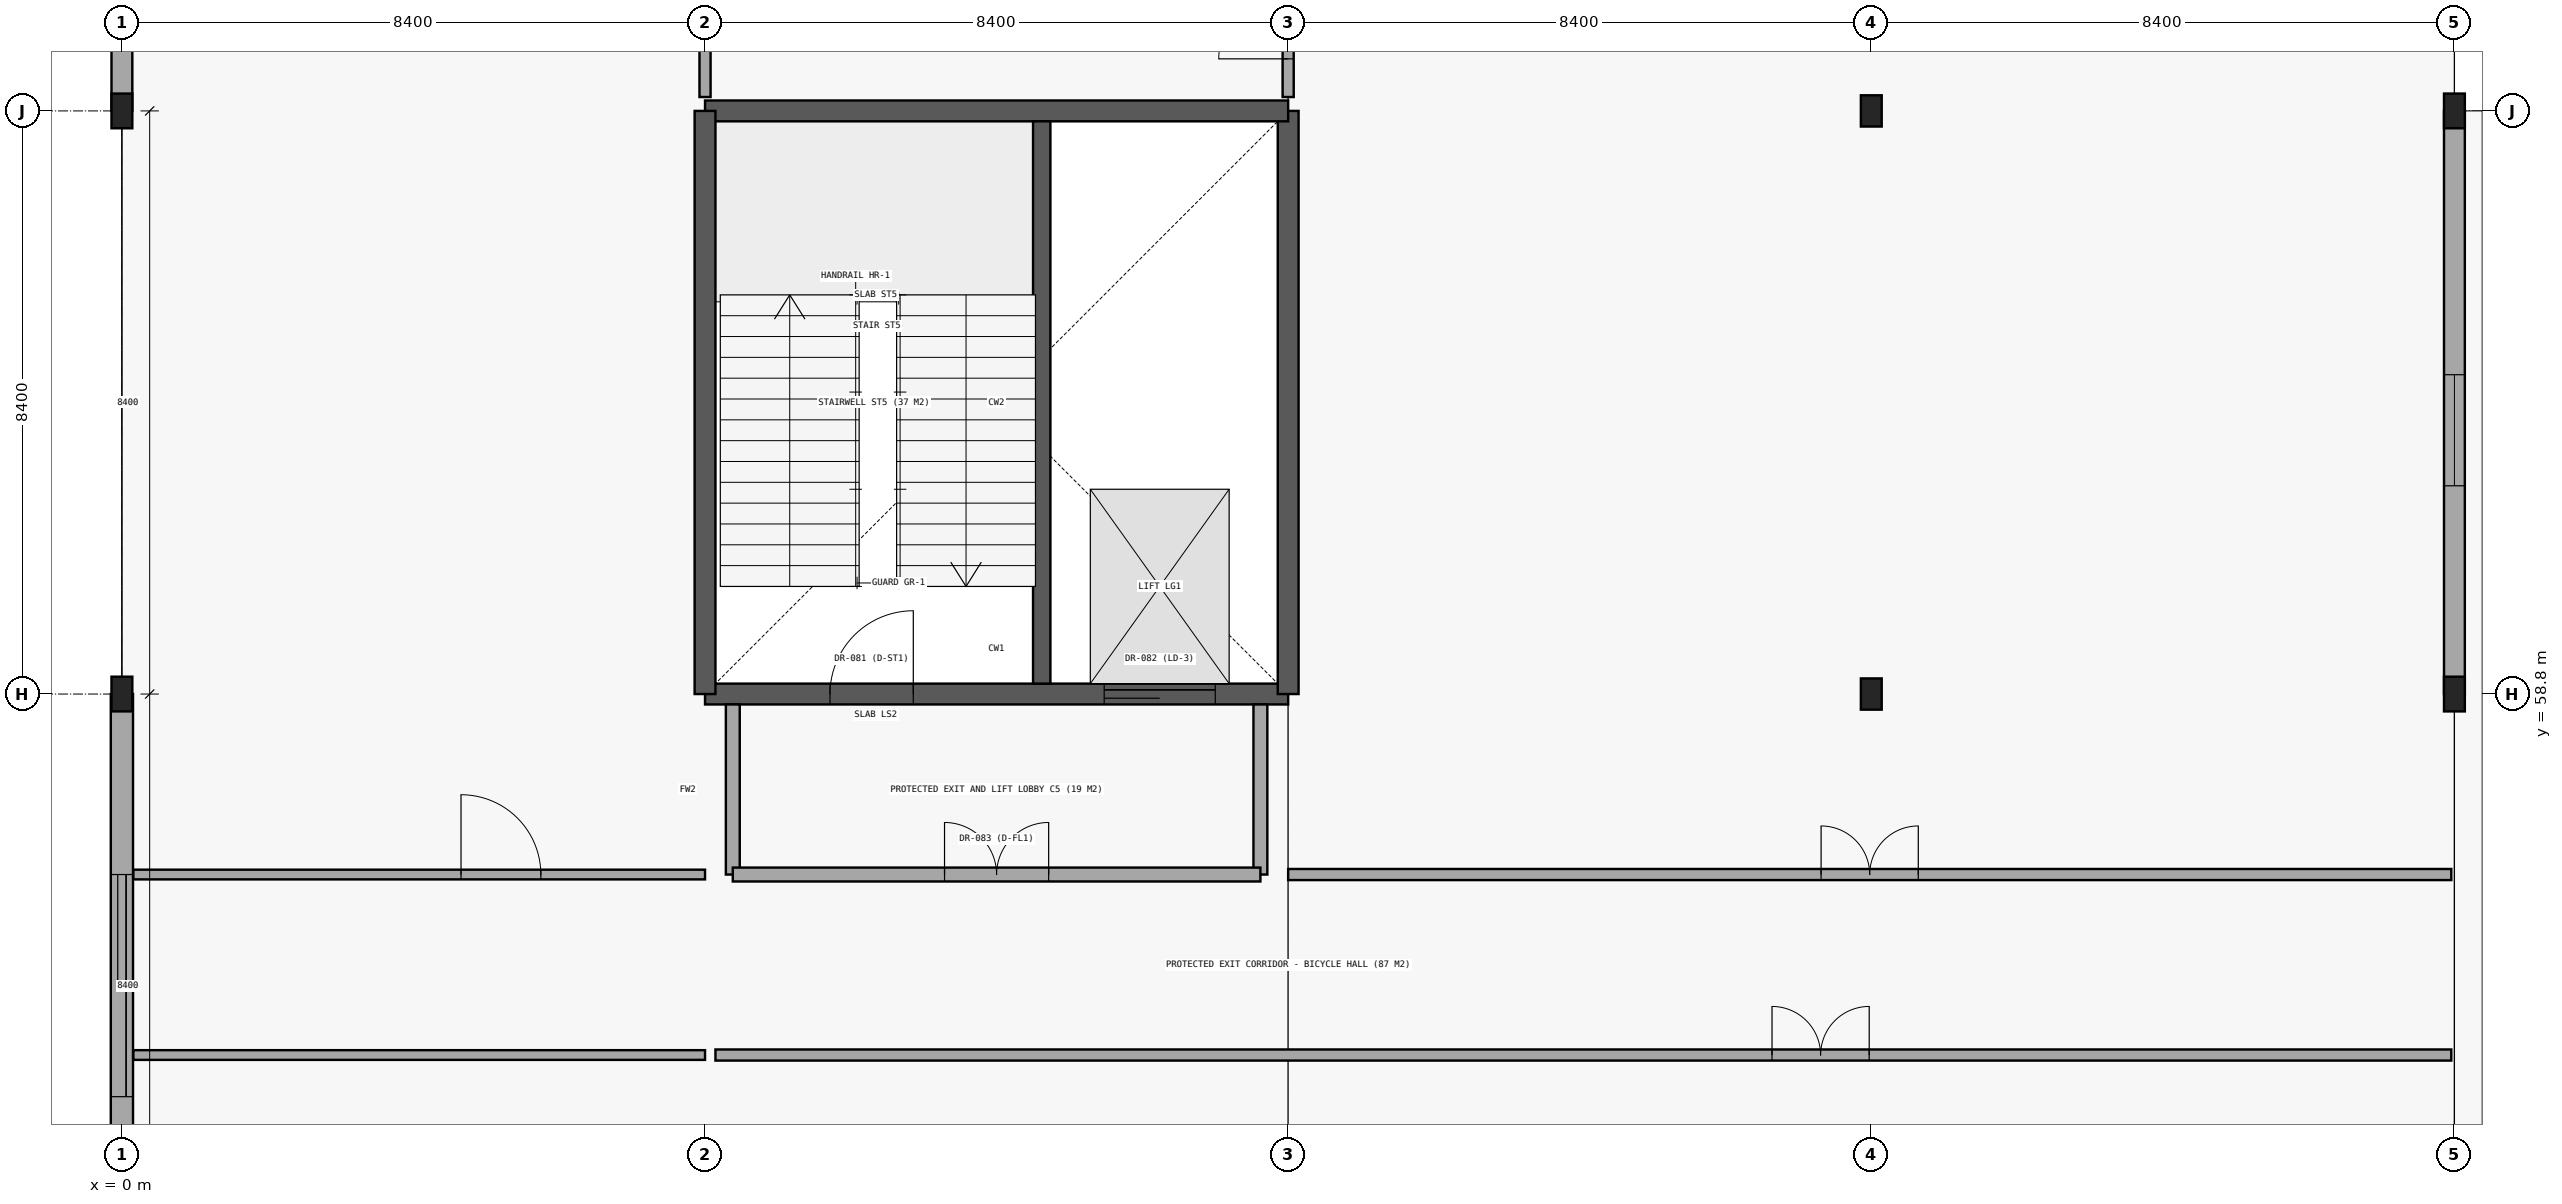
"""IFC4 building model, lengths in metres.
Left out: names, types, materials, properties, quantities, classifications, styles, units other than length and angle.
Written with IfcOpenShell. Run it as: python <this file> out.ifc"""

import sys

from ifc_helpers import new_model, si_unit, direction, frame, frame_2d, origin, origin_2d, place, context, subcontext, project, spatial, rectangle, i_section, extrude, element, fill, save


model = new_model("IFC4")
c1 = context("Model", 3, precision=1e-05, world=origin(), true_north=direction((0.0, 1.0)))
c2 = subcontext(c1, "Body", "Model", "MODEL_VIEW")
j1 = project(units=[si_unit("LENGTHUNIT", "METRE"), si_unit("PLANEANGLEUNIT", "RADIAN")], contexts=[c1])
p1 = place(None, origin())
s1 = spatial("IfcSite", under=j1, at=p1, CompositionType="ELEMENT")
p2 = place(p1, origin())
s2 = spatial("IfcBuilding", under=s1, at=p2, CompositionType="ELEMENT")
p3 = place(p2, origin())
s3 = spatial("IfcBuildingStorey", under=s2, at=p3, CompositionType="ELEMENT", Elevation=0.0)
p4 = place(p3, frame((8.4, 58.8, 0.0), z_axis=(0.0, 0.0, 1.0), x_axis=(1.0, 0.0, 0.0)))
e1 = element("IfcWall", 1, at=p4, inside=s3, PredefinedType="SHEAR", context=c2, shape_type="SweptSolid", body=[
    extrude(rectangle(XDim=8.4, YDim=0.3, at=frame_2d((4.2, 0.0))), origin(), (0.0, 0.0, 1.0), 4.8),
])
p5 = place(p4, frame((1.8, 0.0, 0.0)))
e2 = element("IfcOpeningElement", 2, at=p5, cuts=e1, PredefinedType="OPENING", context=c2, shape_type="SweptSolid", body=[
    extrude(rectangle(XDim=1.2, YDim=2.2, at=frame_2d((0.6, 1.1))), frame((0.0, 0.16, 0.0), z_axis=(0.0, -1.0, 0.0), x_axis=(1.0, 0.0, 0.0)), (0.0, 0.0, 1.0), 0.32),
])
p6 = place(p4, frame((5.75, 0.0, 0.0)))
e3 = element("IfcOpeningElement", 3, at=p6, cuts=e1, PredefinedType="OPENING", context=c2, shape_type="SweptSolid", body=[
    extrude(rectangle(XDim=1.6, YDim=2.4, at=frame_2d((0.8, 1.2))), frame((0.0, 0.16, 0.0), z_axis=(0.0, -1.0, 0.0), x_axis=(1.0, 0.0, 0.0)), (0.0, 0.0, 1.0), 0.32),
])
p7 = place(p3, frame((16.8, 58.8, 0.0), z_axis=(0.0, 0.0, 1.0), x_axis=(0.0, 1.0, 0.0)))
e4 = element("IfcWall", 4, at=p7, inside=s3, PredefinedType="SHEAR", context=c2, shape_type="SweptSolid", body=[
    extrude(rectangle(XDim=8.4, YDim=0.3, at=frame_2d((4.2, 0.0))), origin(), (0.0, 0.0, 1.0), 4.8),
])
p8 = place(p3, frame((16.8, 67.2, 0.0), z_axis=(0.0, 0.0, 1.0), x_axis=(-1.0, 0.0, 0.0)))
e5 = element("IfcWall", 5, at=p8, inside=s3, PredefinedType="SHEAR", context=c2, shape_type="SweptSolid", body=[
    extrude(rectangle(XDim=8.4, YDim=0.3, at=frame_2d((4.2, 0.0))), origin(), (0.0, 0.0, 1.0), 4.8),
])
p9 = place(p3, frame((8.4, 67.2, 0.0), z_axis=(0.0, 0.0, 1.0), x_axis=(0.0, -1.0, 0.0)))
e6 = element("IfcWall", 6, at=p9, inside=s3, PredefinedType="SHEAR", context=c2, shape_type="SweptSolid", body=[
    extrude(rectangle(XDim=8.4, YDim=0.3, at=frame_2d((4.2, 0.0))), origin(), (0.0, 0.0, 1.0), 4.8),
])
p10 = place(p3, frame((13.25, 58.95, 0.0), z_axis=(0.0, 0.0, 1.0), x_axis=(0.0, 1.0, 0.0)))
e7 = element("IfcWall", 7, at=p10, inside=s3, PredefinedType="SHEAR", context=c2, shape_type="SweptSolid", body=[
    extrude(rectangle(XDim=8.1, YDim=0.25, at=frame_2d((4.05, 0.0))), origin(), (0.0, 0.0, 1.0), 4.8),
])
for number, where, z_axis, x_axis in (
    (8, (0.0, 58.8, 0.0), (0.0, 0.0, 1.0), (1.0, 0.0, 0.0)),
    (9, (0.0, 67.2, 0.0), (0.0, 0.0, 1.0), (1.0, 0.0, 0.0)),
):
    element("IfcColumn", number, at=place(p3, frame(where, z_axis=z_axis, x_axis=x_axis)), inside=s3, PredefinedType="COLUMN", context=c2, shape_type="SweptSolid", body=[
        extrude(i_section(OverallWidth=0.3, OverallDepth=0.5, WebThickness=0.014, FlangeThickness=0.028, FilletRadius=0.027, at=origin_2d()), origin(), (0.0, 0.0, 1.0), 4.8),
    ])
for number, where, z_axis, x_axis in (
    (10, (25.2, 58.8, 0.0), (0.0, 0.0, 1.0), (1.0, 0.0, 0.0)),
    (11, (25.2, 67.2, 0.0), (0.0, 0.0, 1.0), (1.0, 0.0, 0.0)),
):
    element("IfcColumn", number, at=place(p3, frame(where, z_axis=z_axis, x_axis=x_axis)), inside=s3, PredefinedType="COLUMN", context=c2, shape_type="SweptSolid", body=[
        extrude(i_section(OverallWidth=0.3, OverallDepth=0.45, WebThickness=0.014, FlangeThickness=0.026, FilletRadius=0.027, at=origin_2d()), origin(), (0.0, 0.0, 1.0), 4.8),
    ])
for number, where, z_axis, x_axis in (
    (12, (33.6, 58.8, 0.0), (0.0, 0.0, 1.0), (1.0, 0.0, 0.0)),
    (13, (33.6, 67.2, 0.0), (0.0, 0.0, 1.0), (1.0, 0.0, 0.0)),
):
    element("IfcColumn", number, at=place(p3, frame(where, z_axis=z_axis, x_axis=x_axis)), inside=s3, PredefinedType="COLUMN", context=c2, shape_type="SweptSolid", body=[
        extrude(i_section(OverallWidth=0.3, OverallDepth=0.5, WebThickness=0.014, FlangeThickness=0.028, FilletRadius=0.027, at=origin_2d()), origin(), (0.0, 0.0, 1.0), 4.8),
    ])
p11 = place(p3, frame((0.0, 58.8, 0.0), z_axis=(0.0, 0.0, 1.0), x_axis=(0.0, -1.0, 0.0)))
e14 = element("IfcWall", 14, at=p11, inside=s3, PredefinedType="STANDARD", context=c2, shape_type="SweptSolid", body=[
    extrude(rectangle(XDim=8.4, YDim=0.32, at=frame_2d((4.2, 0.0))), origin(), (0.0, 0.0, 1.0), 4.22),
])
p12 = place(p11, frame((2.6, 0.0, 0.0)))
e15 = element("IfcOpeningElement", 15, at=p12, cuts=e14, PredefinedType="OPENING", context=c2, shape_type="SweptSolid", body=[
    extrude(rectangle(XDim=3.2, YDim=2.9, at=frame_2d((1.6, 1.45))), frame((0.0, 0.17, 0.0), z_axis=(0.0, -1.0, 0.0), x_axis=(1.0, 0.0, 0.0)), (0.0, 0.0, 1.0), 0.34),
])
p13 = place(p3, frame((0.0, 75.6, 0.0), z_axis=(0.0, 0.0, 1.0), x_axis=(0.0, -1.0, 0.0)))
e16 = element("IfcWall", 16, at=p13, inside=s3, PredefinedType="STANDARD", context=c2, shape_type="SweptSolid", body=[
    extrude(rectangle(XDim=8.4, YDim=0.3, at=frame_2d((4.2, 0.0))), origin(), (0.0, 0.0, 1.0), 4.22),
])
p14 = place(p3, frame((33.6, 58.8, 0.0), z_axis=(0.0, 0.0, 1.0), x_axis=(0.0, 1.0, 0.0)))
e17 = element("IfcWall", 17, at=p14, inside=s3, PredefinedType="STANDARD", context=c2, shape_type="SweptSolid", body=[
    extrude(rectangle(XDim=8.4, YDim=0.3, at=frame_2d((4.2, 0.0))), origin(), (0.0, 0.0, 1.0), 4.22),
])
p15 = place(p14, frame((3.0, 0.0, 2.1)))
e18 = element("IfcOpeningElement", 18, at=p15, cuts=e17, PredefinedType="OPENING", context=c2, shape_type="SweptSolid", body=[
    extrude(rectangle(XDim=1.6, YDim=1.0, at=frame_2d((0.8, 0.5))), frame((0.0, 0.16, 0.0), z_axis=(0.0, -1.0, 0.0), x_axis=(1.0, 0.0, 0.0)), (0.0, 0.0, 1.0), 0.32),
])
p16 = place(p3, frame((8.8, 56.2, 0.0), z_axis=(0.0, 0.0, 1.0), x_axis=(0.0, 1.0, 0.0)))
e19 = element("IfcWall", 19, at=p16, inside=s3, PredefinedType="PARTITIONING", context=c2, shape_type="SweptSolid", body=[
    extrude(rectangle(XDim=2.45, YDim=0.2, at=frame_2d((1.225, 0.0))), origin(), (0.0, 0.0, 1.0), 4.12),
])
p17 = place(p3, frame((16.4, 56.2, 0.0), z_axis=(0.0, 0.0, 1.0), x_axis=(0.0, 1.0, 0.0)))
e20 = element("IfcWall", 20, at=p17, inside=s3, PredefinedType="PARTITIONING", context=c2, shape_type="SweptSolid", body=[
    extrude(rectangle(XDim=2.45, YDim=0.2, at=frame_2d((1.225, 0.0))), origin(), (0.0, 0.0, 1.0), 4.1),
])
p18 = place(p3, frame((8.8, 56.2, 0.0), z_axis=(0.0, 0.0, 1.0), x_axis=(1.0, 0.0, 0.0)))
e21 = element("IfcWall", 21, at=p18, inside=s3, PredefinedType="PARTITIONING", context=c2, shape_type="SweptSolid", body=[
    extrude(rectangle(XDim=7.6, YDim=0.2, at=frame_2d((3.8, 0.0))), origin(), (0.0, 0.0, 1.0), 4.12),
])
p19 = place(p18, frame((3.05, 0.0, 0.0)))
e22 = element("IfcOpeningElement", 22, at=p19, cuts=e21, PredefinedType="OPENING", context=c2, shape_type="SweptSolid", body=[
    extrude(rectangle(XDim=1.5, YDim=2.2, at=frame_2d((0.75, 1.1))), frame((0.0, 0.11, 0.0), z_axis=(0.0, -1.0, 0.0), x_axis=(1.0, 0.0, 0.0)), (0.0, 0.0, 1.0), 0.22),
])
p20 = place(p3, frame((0.165, 53.6, 0.0), z_axis=(0.0, 0.0, 1.0), x_axis=(1.0, 0.0, 0.0)))
e23 = element("IfcWall", 23, at=p20, inside=s3, PredefinedType="PARTITIONING", context=c2, shape_type="SweptSolid", body=[
    extrude(rectangle(XDim=8.235, YDim=0.14, at=frame_2d((4.117, 0.0))), origin(), (0.0, 0.0, 1.0), 4.1),
])
p21 = place(p3, frame((8.55, 53.6, 0.0), z_axis=(0.0, 0.0, 1.0), x_axis=(1.0, 0.0, 0.0)))
e24 = element("IfcWall", 24, at=p21, inside=s3, PredefinedType="PARTITIONING", context=c2, shape_type="SweptSolid", body=[
    extrude(rectangle(XDim=25.005, YDim=0.16, at=frame_2d((12.502, 0.0))), origin(), (0.0, 0.0, 1.0), 4.1),
])
p22 = place(p21, frame((15.22, 0.0, 0.0)))
e25 = element("IfcOpeningElement", 25, at=p22, cuts=e24, PredefinedType="OPENING", context=c2, shape_type="SweptSolid", body=[
    extrude(rectangle(XDim=1.4, YDim=2.25, at=frame_2d((0.7, 1.125))), frame((0.0, 0.09, 0.0), z_axis=(0.0, -1.0, 0.0), x_axis=(1.0, 0.0, 0.0)), (0.0, 0.0, 1.0), 0.18),
])
p23 = place(p3, frame((0.165, 56.2, 0.0), z_axis=(0.0, 0.0, 1.0), x_axis=(1.0, 0.0, 0.0)))
e26 = element("IfcWall", 26, at=p23, inside=s3, PredefinedType="PARTITIONING", context=c2, shape_type="SweptSolid", body=[
    extrude(rectangle(XDim=8.235, YDim=0.14, at=frame_2d((4.117, 0.0))), origin(), (0.0, 0.0, 1.0), 4.1),
])
p24 = place(p23, frame((4.72, 0.0, 0.0)))
e27 = element("IfcOpeningElement", 27, at=p24, cuts=e26, PredefinedType="OPENING", context=c2, shape_type="SweptSolid", body=[
    extrude(rectangle(XDim=1.15, YDim=2.15, at=frame_2d((0.575, 1.075))), frame((0.0, 0.08, 0.0), z_axis=(0.0, -1.0, 0.0), x_axis=(1.0, 0.0, 0.0)), (0.0, 0.0, 1.0), 0.16),
])
p25 = place(p3, frame((16.8, 56.2, 0.0), z_axis=(0.0, 0.0, 1.0), x_axis=(1.0, 0.0, 0.0)))
e28 = element("IfcWall", 28, at=p25, inside=s3, PredefinedType="PARTITIONING", context=c2, shape_type="SweptSolid", body=[
    extrude(rectangle(XDim=16.755, YDim=0.16, at=frame_2d((8.377, 0.0))), origin(), (0.0, 0.0, 1.0), 4.1),
])
p26 = place(p25, frame((7.677, 0.0, 0.0)))
e29 = element("IfcOpeningElement", 29, at=p26, cuts=e28, PredefinedType="OPENING", context=c2, shape_type="SweptSolid", body=[
    extrude(rectangle(XDim=1.4, YDim=2.25, at=frame_2d((0.7, 1.125))), frame((0.0, 0.09, 0.0), z_axis=(0.0, -1.0, 0.0), x_axis=(1.0, 0.0, 0.0)), (0.0, 0.0, 1.0), 0.18),
])
p27 = place(p3, frame((8.4, 67.4, 0.0), z_axis=(0.0, 0.0, 1.0), x_axis=(0.0, 1.0, 0.0)))
e30 = element("IfcWall", 30, at=p27, inside=s3, PredefinedType="PARTITIONING", context=c2, shape_type="SweptSolid", body=[
    extrude(rectangle(XDim=14.6, YDim=0.16, at=frame_2d((7.3, 0.0))), origin(), (0.0, 0.0, 1.0), 4.1),
])
p28 = place(p3, frame((16.8, 67.4, 0.0), z_axis=(0.0, 0.0, 1.0), x_axis=(0.0, 1.0, 0.0)))
e31 = element("IfcWall", 31, at=p28, inside=s3, PredefinedType="PARTITIONING", context=c2, shape_type="SweptSolid", body=[
    extrude(rectangle(XDim=14.6, YDim=0.16, at=frame_2d((7.3, 0.0))), origin(), (0.0, 0.0, 1.0), 4.1),
])
p29 = place(p28, frame((0.55, 0.0, 0.0)))
e32 = element("IfcOpeningElement", 32, at=p29, cuts=e31, PredefinedType="OPENING", context=c2, shape_type="SweptSolid", body=[
    extrude(rectangle(XDim=1.0, YDim=2.15, at=frame_2d((0.5, 1.075))), frame((0.0, 0.09, 0.0), z_axis=(0.0, -1.0, 0.0), x_axis=(1.0, 0.0, 0.0)), (0.0, 0.0, 1.0), 0.18),
])
p30 = place(p12, origin())
e33 = element("IfcDoor", 33, at=p30, inside=s3, OperationType="SLIDING_TO_RIGHT", PredefinedType="GATE", context=c2, shape_type="SweptSolid", body=[
    extrude(rectangle(XDim=3.2, YDim=2.9, at=frame_2d((1.6, 1.45))), frame((0.0, 0.025, 0.0), z_axis=(0.0, -1.0, 0.0), x_axis=(1.0, 0.0, 0.0)), (0.0, 0.0, 1.0), 0.05),
])
fill(e15, e33)
p31 = place(p15, origin())
e34 = element("IfcWindow", 34, at=p31, inside=s3, PartitioningType="SINGLE_PANEL", PredefinedType="WINDOW", context=c2, shape_type="SweptSolid", body=[
    extrude(rectangle(XDim=1.6, YDim=1.0, at=frame_2d((0.8, 0.5))), frame((0.0, 0.03, 0.0), z_axis=(0.0, -1.0, 0.0), x_axis=(1.0, 0.0, 0.0)), (0.0, 0.0, 1.0), 0.06),
])
fill(e18, e34)
p32 = place(p5, origin())
e35 = element("IfcDoor", 35, at=p32, inside=s3, OperationType="SINGLE_SWING_RIGHT", PredefinedType="DOOR", context=c2, shape_type="SweptSolid", body=[
    extrude(rectangle(XDim=1.2, YDim=2.2, at=frame_2d((0.6, 1.1))), frame((0.0, 0.025, 0.0), z_axis=(0.0, -1.0, 0.0), x_axis=(1.0, 0.0, 0.0)), (0.0, 0.0, 1.0), 0.05),
])
fill(e2, e35)
p33 = place(p6, origin())
e36 = element("IfcDoor", 36, at=p33, inside=s3, OperationType="SLIDING_TO_LEFT", PredefinedType="DOOR", context=c2, shape_type="SweptSolid", body=[
    extrude(rectangle(XDim=1.6, YDim=2.4, at=frame_2d((0.8, 1.2))), frame((0.0, 0.025, 0.0), z_axis=(0.0, -1.0, 0.0), x_axis=(1.0, 0.0, 0.0)), (0.0, 0.0, 1.0), 0.05),
])
fill(e3, e36)
p34 = place(p19, origin())
e37 = element("IfcDoor", 37, at=p34, inside=s3, OperationType="DOUBLE_DOOR_SINGLE_SWING", PredefinedType="DOOR", context=c2, shape_type="SweptSolid", body=[
    extrude(rectangle(XDim=1.5, YDim=2.2, at=frame_2d((0.75, 1.1))), frame((0.0, 0.025, 0.0), z_axis=(0.0, -1.0, 0.0), x_axis=(1.0, 0.0, 0.0)), (0.0, 0.0, 1.0), 0.05),
])
fill(e22, e37)
p35 = place(p22, origin())
e38 = element("IfcDoor", 38, at=p35, inside=s3, OperationType="DOUBLE_DOOR_SINGLE_SWING", PredefinedType="DOOR", context=c2, shape_type="SweptSolid", body=[
    extrude(rectangle(XDim=1.4, YDim=2.25, at=frame_2d((0.7, 1.125))), frame((0.0, 0.025, 0.0), z_axis=(0.0, -1.0, 0.0), x_axis=(1.0, 0.0, 0.0)), (0.0, 0.0, 1.0), 0.05),
])
fill(e25, e38)
p36 = place(p24, origin())
e39 = element("IfcDoor", 39, at=p36, inside=s3, OperationType="SINGLE_SWING_LEFT", PredefinedType="DOOR", context=c2, shape_type="SweptSolid", body=[
    extrude(rectangle(XDim=1.15, YDim=2.15, at=frame_2d((0.575, 1.075))), frame((0.0, 0.025, 0.0), z_axis=(0.0, -1.0, 0.0), x_axis=(1.0, 0.0, 0.0)), (0.0, 0.0, 1.0), 0.05),
])
fill(e27, e39)
p37 = place(p26, origin())
e40 = element("IfcDoor", 40, at=p37, inside=s3, OperationType="DOUBLE_DOOR_SINGLE_SWING", PredefinedType="DOOR", context=c2, shape_type="SweptSolid", body=[
    extrude(rectangle(XDim=1.4, YDim=2.25, at=frame_2d((0.7, 1.125))), frame((0.0, 0.025, 0.0), z_axis=(0.0, -1.0, 0.0), x_axis=(1.0, 0.0, 0.0)), (0.0, 0.0, 1.0), 0.05),
])
fill(e29, e40)
p38 = place(p29, origin())
e41 = element("IfcDoor", 41, at=p38, inside=s3, OperationType="SINGLE_SWING_LEFT", PredefinedType="DOOR", context=c2, shape_type="SweptSolid", body=[
    extrude(rectangle(XDim=1.0, YDim=2.15, at=frame_2d((0.5, 1.075))), frame((0.0, 0.025, 0.0), z_axis=(0.0, -1.0, 0.0), x_axis=(1.0, 0.0, 0.0)), (0.0, 0.0, 1.0), 0.05),
])
fill(e32, e41)
save(model, sys.argv[1])
